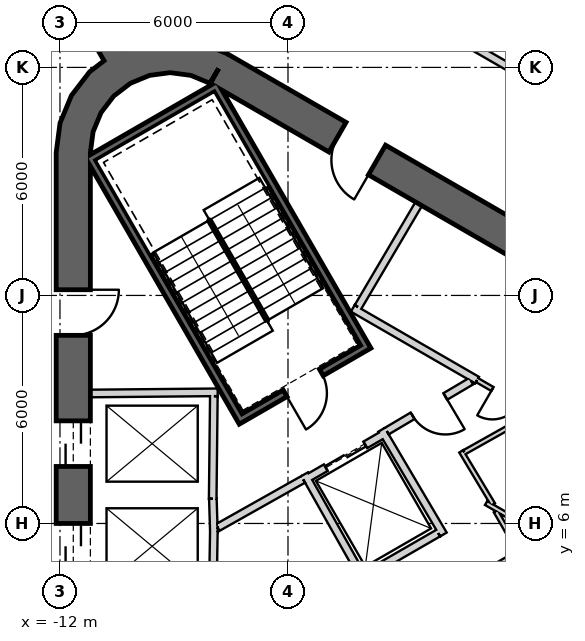
"""IFC4 building model, lengths in metres.
Left out: names, types, materials, properties, quantities, classifications, styles, units other than length and angle.
Written with IfcOpenShell. Run it as: python <this file> out.ifc"""

import sys

from ifc_helpers import new_model, si_unit, direction, frame, frame_2d, origin, place, context, subcontext, project, spatial, polyline, rectangle, outline, extrude, element, fill, save


model = new_model("IFC4")
c1 = context("Model", 3, precision=1e-05, world=origin(), true_north=direction((0.0, 1.0)))
c2 = subcontext(c1, "Body", "Model", "MODEL_VIEW")
j1 = project(units=[si_unit("LENGTHUNIT", "METRE"), si_unit("PLANEANGLEUNIT", "RADIAN")], contexts=[c1])
p1 = place(None, origin())
s1 = spatial("IfcSite", under=j1, at=p1, CompositionType="ELEMENT")
p2 = place(p1, origin())
s2 = spatial("IfcBuilding", under=s1, at=p2, CompositionType="ELEMENT")
p3 = place(p2, frame((0.0, 0.0, 345.5)))
s3 = spatial("IfcBuildingStorey", under=s2, at=p3, CompositionType="ELEMENT", Elevation=345.5)
p4 = place(p3, frame((19.475, 2.208, 0.0), z_axis=(0.0, 0.0, 1.0), x_axis=(-0.866028369851, 0.499994862586, 0.0)))
e1 = element("IfcWall", 1, at=p4, inside=s3, PredefinedType="SHEAR", context=c2, shape_type="SweptSolid", body=[
    extrude(rectangle(XDim=31.523, YDim=0.9, at=frame_2d((15.762, 0.0))), origin(), (0.0, 0.0, 1.0), 3.9),
])
p5 = place(p4, frame((7.062, 0.0, 0.0)))
e2 = element("IfcOpeningElement", 2, at=p5, cuts=e1, PredefinedType="OPENING", context=c2, shape_type="SweptSolid", body=[
    extrude(rectangle(XDim=1.2, YDim=2.4, at=frame_2d((0.6, 1.2))), frame((0.0, 0.46, 0.0), z_axis=(0.0, -1.0, 0.0), x_axis=(1.0, 0.0, 0.0)), (0.0, 0.0, 1.0), 0.92),
])
p6 = place(p4, frame((3.612, 0.0, 0.0)))
e3 = element("IfcOpeningElement", 3, at=p6, cuts=e1, PredefinedType="OPENING", context=c2, shape_type="SweptSolid", body=[
    extrude(rectangle(XDim=1.2, YDim=2.4, at=frame_2d((0.6, 1.2))), frame((0.0, 0.46, 0.0), z_axis=(0.0, -1.0, 0.0), x_axis=(1.0, 0.0, 0.0)), (0.0, 0.0, 1.0), 0.92),
])
p7 = place(p4, frame((26.712, 0.0, 0.0)))
e4 = element("IfcOpeningElement", 4, at=p7, cuts=e1, PredefinedType="OPENING", context=c2, shape_type="SweptSolid", body=[
    extrude(rectangle(XDim=1.2, YDim=2.4, at=frame_2d((0.6, 1.2))), frame((0.0, 0.46, 0.0), z_axis=(0.0, -1.0, 0.0), x_axis=(1.0, 0.0, 0.0)), (0.0, 0.0, 1.0), 0.92),
])
p8 = place(p3, frame((-11.65, 15.762, 0.0), z_axis=(0.0, 0.0, 1.0), x_axis=(0.0, -1.0, 0.0)))
e5 = element("IfcWall", 5, at=p8, inside=s3, PredefinedType="SHEAR", context=c2, shape_type="SweptSolid", body=[
    extrude(rectangle(XDim=31.523, YDim=0.9, at=frame_2d((15.762, 0.0))), origin(), (0.0, 0.0, 1.0), 3.9),
])
p9 = place(p8, frame((7.062, 0.0, 0.0)))
e6 = element("IfcOpeningElement", 6, at=p9, cuts=e5, PredefinedType="OPENING", context=c2, shape_type="SweptSolid", body=[
    extrude(rectangle(XDim=1.2, YDim=2.4, at=frame_2d((0.6, 1.2))), frame((0.0, 0.46, 0.0), z_axis=(0.0, -1.0, 0.0), x_axis=(1.0, 0.0, 0.0)), (0.0, 0.0, 1.0), 0.92),
])
p10 = place(p8, frame((9.762, 0.0, 0.0)))
e7 = element("IfcOpeningElement", 7, at=p10, cuts=e5, PredefinedType="OPENING", context=c2, shape_type="SweptSolid", body=[
    extrude(rectangle(XDim=1.2, YDim=2.4, at=frame_2d((0.6, 1.2))), frame((0.0, 0.46, 0.0), z_axis=(0.0, -1.0, 0.0), x_axis=(1.0, 0.0, 0.0)), (0.0, 0.0, 1.0), 0.92),
])
p11 = place(p8, frame((12.462, 0.0, 0.0)))
e8 = element("IfcOpeningElement", 8, at=p11, cuts=e5, PredefinedType="OPENING", context=c2, shape_type="SweptSolid", body=[
    extrude(rectangle(XDim=1.2, YDim=2.4, at=frame_2d((0.6, 1.2))), frame((0.0, 0.46, 0.0), z_axis=(0.0, -1.0, 0.0), x_axis=(1.0, 0.0, 0.0)), (0.0, 0.0, 1.0), 0.92),
])
p12 = place(p8, frame((15.162, 0.0, 0.0)))
e9 = element("IfcOpeningElement", 9, at=p12, cuts=e5, PredefinedType="OPENING", context=c2, shape_type="SweptSolid", body=[
    extrude(rectangle(XDim=1.2, YDim=2.4, at=frame_2d((0.6, 1.2))), frame((0.0, 0.46, 0.0), z_axis=(0.0, -1.0, 0.0), x_axis=(1.0, 0.0, 0.0)), (0.0, 0.0, 1.0), 0.92),
])
p13 = place(p8, frame((17.862, 0.0, 0.0)))
e10 = element("IfcOpeningElement", 10, at=p13, cuts=e5, PredefinedType="OPENING", context=c2, shape_type="SweptSolid", body=[
    extrude(rectangle(XDim=1.2, YDim=2.4, at=frame_2d((0.6, 1.2))), frame((0.0, 0.46, 0.0), z_axis=(0.0, -1.0, 0.0), x_axis=(1.0, 0.0, 0.0)), (0.0, 0.0, 1.0), 0.92),
])
p14 = place(p8, frame((20.562, 0.0, 0.0)))
e11 = element("IfcOpeningElement", 11, at=p14, cuts=e5, PredefinedType="OPENING", context=c2, shape_type="SweptSolid", body=[
    extrude(rectangle(XDim=1.2, YDim=2.4, at=frame_2d((0.6, 1.2))), frame((0.0, 0.46, 0.0), z_axis=(0.0, -1.0, 0.0), x_axis=(1.0, 0.0, 0.0)), (0.0, 0.0, 1.0), 0.92),
])
p15 = place(p8, frame((23.262, 0.0, 0.0)))
e12 = element("IfcOpeningElement", 12, at=p15, cuts=e5, PredefinedType="OPENING", context=c2, shape_type="SweptSolid", body=[
    extrude(rectangle(XDim=1.2, YDim=2.4, at=frame_2d((0.6, 1.2))), frame((0.0, 0.46, 0.0), z_axis=(0.0, -1.0, 0.0), x_axis=(1.0, 0.0, 0.0)), (0.0, 0.0, 1.0), 0.92),
])
p16 = place(p8, frame((3.612, 0.0, 0.0)))
e13 = element("IfcOpeningElement", 13, at=p16, cuts=e5, PredefinedType="OPENING", context=c2, shape_type="SweptSolid", body=[
    extrude(rectangle(XDim=1.2, YDim=2.4, at=frame_2d((0.6, 1.2))), frame((0.0, 0.46, 0.0), z_axis=(0.0, -1.0, 0.0), x_axis=(1.0, 0.0, 0.0)), (0.0, 0.0, 1.0), 0.92),
])
p17 = place(p8, frame((26.712, 0.0, 0.0)))
e14 = element("IfcOpeningElement", 14, at=p17, cuts=e5, PredefinedType="OPENING", context=c2, shape_type="SweptSolid", body=[
    extrude(rectangle(XDim=1.2, YDim=2.4, at=frame_2d((0.6, 1.2))), frame((0.0, 0.46, 0.0), z_axis=(0.0, -1.0, 0.0), x_axis=(1.0, 0.0, 0.0)), (0.0, 0.0, 1.0), 0.92),
])
p18 = place(p3, origin())
e15 = element("IfcWall", 15, at=p18, inside=s3, PredefinedType="SHEAR", context=c2, shape_type="SweptSolid", body=[
    extrude(outline(polyline([(-7.6, 18.36), (-8.323, 18.659), (-9.1, 18.762), (-9.876, 18.659), (-10.6, 18.36), (-11.221, 17.883), (-11.698, 17.262), (-11.998, 16.538), (-12.1, 15.762), (-11.2, 15.762), (-11.128, 16.305), (-10.919, 16.812), (-10.585, 17.247), (-10.15, 17.58), (-9.644, 17.79), (-9.1, 17.862), (-8.556, 17.79), (-8.05, 17.58), (-7.6, 18.36)])), origin(), (0.0, 0.0, 1.0), 3.9),
])
p19 = place(p3, frame((-10.575, 18.316, 0.0), z_axis=(0.0, 0.0, 1.0), x_axis=(-0.500010354293, 0.866019425648, 0.0)))
e16 = element("IfcWall", 16, at=p19, inside=s3, PredefinedType="SHEAR", context=c2, shape_type="SweptSolid", body=[
    extrude(rectangle(XDim=7.854, YDim=0.6, at=frame_2d((3.927, 0.0))), origin(), (0.0, 0.0, 1.0), 3.9),
])
p20 = place(p19, frame((1.4, 0.0, 0.0)))
e17 = element("IfcOpeningElement", 17, at=p20, cuts=e16, PredefinedType="OPENING", context=c2, shape_type="SweptSolid", body=[
    extrude(rectangle(XDim=1.4, YDim=2.4, at=frame_2d((0.7, 1.2))), frame((0.0, 0.31, 0.0), z_axis=(0.0, -1.0, 0.0), x_axis=(1.0, 0.0, 0.0)), (0.0, 0.0, 1.0), 0.62),
])
p21 = place(p3, frame((-11.2, 9.42, 0.0), z_axis=(0.0, 0.0, 1.0), x_axis=(0.999957167047, 0.009255488683, 0.0)))
e18 = element("IfcWall", 18, at=p21, inside=s3, PredefinedType="PLUMBINGWALL", context=c2, shape_type="SweptSolid", body=[
    extrude(rectangle(XDim=3.35, YDim=0.2, at=frame_2d((1.675, 0.0))), origin(), (0.0, 0.0, 1.0), 3.6),
])
p22 = place(p3, frame((-7.951, 9.35, 0.0), z_axis=(0.0, 0.0, 1.0), x_axis=(-0.011120469654, -0.999938165666, 0.0)))
e19 = element("IfcWall", 19, at=p22, inside=s3, PredefinedType="PLUMBINGWALL", context=c2, shape_type="SweptSolid", body=[
    extrude(rectangle(XDim=2.7, YDim=0.2, at=frame_2d((1.35, 0.0))), origin(), (0.0, 0.0, 1.0), 3.6),
])
p23 = place(p3, frame((-7.977, 6.65, 0.0), z_axis=(0.0, 0.0, 1.0), x_axis=(0.030861509705, -0.999523670164, 0.0)))
e20 = element("IfcWall", 20, at=p23, inside=s3, PredefinedType="PLUMBINGWALL", context=c2, shape_type="SweptSolid", body=[
    extrude(rectangle(XDim=0.878, YDim=0.2, at=frame_2d((0.439, 0.0))), origin(), (0.0, 0.0, 1.0), 3.6),
])
p24 = place(p3, frame((-7.949, 5.894, 0.0), z_axis=(0.0, 0.0, 1.0), x_axis=(-0.016809909365, -0.999858703491, 0.0)))
e21 = element("IfcWall", 21, at=p24, inside=s3, PredefinedType="PLUMBINGWALL", context=c2, shape_type="SweptSolid", body=[
    extrude(rectangle(XDim=1.844, YDim=0.2, at=frame_2d((0.922, 0.0))), origin(), (0.0, 0.0, 1.0), 3.6),
])
p25 = place(p3, frame((-11.245, 15.678, -0.3), z_axis=(0.0, 0.0, 1.0), x_axis=(0.499977274689, -0.866038523851, 0.0)))
e22 = element("IfcWall", 22, at=p25, inside=s3, PredefinedType="SHEAR", context=c2, shape_type="SweptSolid", body=[
    extrude(rectangle(XDim=8.1, YDim=0.2, at=frame_2d((4.05, 0.0))), origin(), (0.0, 0.0, 1.0), 3.9),
])
p26 = place(p3, frame((-7.818, 17.541, -0.3), z_axis=(0.0, 0.0, 1.0), x_axis=(-0.866044365799, -0.499967155389, 0.0)))
e23 = element("IfcWall", 23, at=p26, inside=s3, PredefinedType="SHEAR", context=c2, shape_type="SweptSolid", body=[
    extrude(rectangle(XDim=3.8, YDim=0.2, at=frame_2d((1.9, 0.0))), origin(), (0.0, 0.0, 1.0), 3.9),
])
p27 = place(p3, frame((-7.854, 17.405, -0.3), z_axis=(0.0, 0.0, 1.0), x_axis=(0.499997992926, -0.866026562566, 0.0)))
e24 = element("IfcWall", 24, at=p27, inside=s3, PredefinedType="SHEAR", context=c2, shape_type="SweptSolid", body=[
    extrude(rectangle(XDim=7.9, YDim=0.2, at=frame_2d((3.95, 0.0))), origin(), (0.0, 0.0, 1.0), 3.9),
])
p28 = place(p3, frame((-7.159, 8.8, -0.3), z_axis=(0.0, 0.0, 1.0), x_axis=(0.866047807691, 0.499961193289, 0.0)))
e25 = element("IfcWall", 25, at=p28, inside=s3, PredefinedType="SHEAR", context=c2, shape_type="SweptSolid", body=[
    extrude(rectangle(XDim=3.6, YDim=0.2, at=frame_2d((1.8, 0.0))), origin(), (0.0, 0.0, 1.0), 3.9),
])
p29 = place(p28, frame((1.25, 0.0, 0.3)))
e26 = element("IfcOpeningElement", 26, at=p29, cuts=e25, PredefinedType="OPENING", context=c2, shape_type="SweptSolid", body=[
    extrude(rectangle(XDim=1.1, YDim=2.1, at=frame_2d((0.55, 1.05))), frame((0.0, 0.11, 0.0), z_axis=(0.0, -1.0, 0.0), x_axis=(1.0, 0.0, 0.0)), (0.0, 0.0, 1.0), 0.22),
])
p30 = place(p3, frame((-5.524, 7.168, 0.0), z_axis=(0.0, 0.0, 1.0), x_axis=(0.866024647952, 0.500001309137, 0.0)))
e27 = element("IfcWall", 27, at=p30, inside=s3, PredefinedType="PLUMBINGWALL", context=c2, shape_type="SweptSolid", body=[
    extrude(rectangle(XDim=2.4, YDim=0.2, at=frame_2d((1.2, 0.0))), origin(), (0.0, 0.0, 1.0), 3.6),
])
p31 = place(p30, frame((0.6, 0.0, 0.0)))
e28 = element("IfcOpeningElement", 28, at=p31, cuts=e27, PredefinedType="OPENING", context=c2, shape_type="SweptSolid", body=[
    extrude(rectangle(XDim=1.2, YDim=2.4, at=frame_2d((0.6, 1.2))), frame((0.0, 0.11, 0.0), z_axis=(0.0, -1.0, 0.0), x_axis=(1.0, 0.0, 0.0)), (0.0, 0.0, 1.0), 0.22),
])
p32 = place(p3, frame((-4.039, 4.596, 0.0), z_axis=(0.0, 0.0, 1.0), x_axis=(-0.491322718731, 0.870977603649, 0.0)))
e29 = element("IfcWall", 29, at=p32, inside=s3, PredefinedType="PLUMBINGWALL", context=c2, shape_type="SweptSolid", body=[
    extrude(rectangle(XDim=3.1, YDim=0.2, at=frame_2d((1.55, 0.0))), origin(), (0.0, 0.0, 1.0), 3.6),
])
p33 = place(p3, frame((-3.538, 8.465, 0.0), z_axis=(0.0, 0.0, 1.0), x_axis=(0.508616218331, -0.860993346345, 0.0)))
e30 = element("IfcWall", 30, at=p33, inside=s3, PredefinedType="PLUMBINGWALL", context=c2, shape_type="SweptSolid", body=[
    extrude(rectangle(XDim=3.2, YDim=0.2, at=frame_2d((1.6, 0.0))), origin(), (0.0, 0.0, 1.0), 3.6),
])
p34 = place(p3, frame((-2.047, 5.746, 0.0), z_axis=(0.0, 0.0, 1.0), x_axis=(-0.866019606374, -0.500010041276, 0.0)))
e31 = element("IfcWall", 31, at=p34, inside=s3, PredefinedType="PLUMBINGWALL", context=c2, shape_type="SweptSolid", body=[
    extrude(rectangle(XDim=2.205, YDim=0.2, at=frame_2d((1.102, 0.0))), origin(), (0.0, 0.0, 1.0), 3.6),
])
p35 = place(p3, frame((-1.024, 9.771, 0.0), z_axis=(0.0, 0.0, 1.0), x_axis=(0.866039397417, -0.499975761534, 0.0)))
e32 = element("IfcWall", 32, at=p35, inside=s3, PredefinedType="PARTITIONING", context=c2, shape_type="SweptSolid", body=[
    extrude(rectangle(XDim=1.752, YDim=0.12, at=frame_2d((0.876, 0.0))), origin(), (0.0, 0.0, 1.0), 3.6),
])
p36 = place(p35, frame((0.466, 0.0, 0.0)))
e33 = element("IfcOpeningElement", 33, at=p36, cuts=e32, PredefinedType="OPENING", context=c2, shape_type="SweptSolid", body=[
    extrude(rectangle(XDim=0.8, YDim=2.1, at=frame_2d((0.4, 1.05))), frame((0.0, 0.07, 0.0), z_axis=(0.0, -1.0, 0.0), x_axis=(1.0, 0.0, 0.0)), (0.0, 0.0, 1.0), 0.14),
])
p37 = place(p3, frame((-4.296, 11.66, 0.0), z_axis=(0.0, 0.0, 1.0), x_axis=(0.866027389382, -0.499996560828, 0.0)))
e34 = element("IfcWall", 34, at=p37, inside=s3, PredefinedType="PARTITIONING", context=c2, shape_type="SweptSolid", body=[
    extrude(rectangle(XDim=3.778, YDim=0.2, at=frame_2d((1.889, 0.0))), origin(), (0.0, 0.0, 1.0), 3.6),
])
p38 = place(p3, frame((-2.558, 14.409, 0.0), z_axis=(0.0, 0.0, 1.0), x_axis=(-0.508018930956, -0.861345903683, 0.0)))
e35 = element("IfcWall", 35, at=p38, inside=s3, PredefinedType="PARTITIONING", context=c2, shape_type="SweptSolid", body=[
    extrude(rectangle(XDim=3.15, YDim=0.2, at=frame_2d((1.575, 0.0))), origin(), (0.0, 0.0, 1.0), 3.6),
])
p39 = place(p3, frame((-5.6, 7.16, 0.0), z_axis=(0.0, 0.0, 1.0), x_axis=(-0.871340486379, -0.490678873396, 0.0)))
e36 = element("IfcWall", 36, at=p39, inside=s3, PredefinedType="PARTITIONING", context=c2, shape_type="SweptSolid", body=[
    extrude(rectangle(XDim=2.581, YDim=0.2, at=frame_2d((1.291, 0.0))), origin(), (0.0, 0.0, 1.0), 3.6),
])
p40 = place(p3, frame((-1.179, 9.745, 0.0), z_axis=(0.0, 0.0, 1.0), x_axis=(-0.860630814782, -0.509229418482, 0.0)))
e37 = element("IfcWall", 37, at=p40, inside=s3, PredefinedType="PARTITIONING", context=c2, shape_type="SweptSolid", body=[
    extrude(rectangle(XDim=2.582, YDim=0.2, at=frame_2d((1.291, 0.0))), origin(), (0.0, 0.0, 1.0), 3.6),
])
p41 = place(p40, frame((0.791, 0.0, 0.0)))
e38 = element("IfcOpeningElement", 38, at=p41, cuts=e37, PredefinedType="OPENING", context=c2, shape_type="SweptSolid", body=[
    extrude(rectangle(XDim=1.0, YDim=2.1, at=frame_2d((0.5, 1.05))), frame((0.0, 0.11, 0.0), z_axis=(0.0, -1.0, 0.0), x_axis=(1.0, 0.0, 0.0)), (0.0, 0.0, 1.0), 0.22),
])
p42 = place(p3, frame((-0.786, 6.538, 0.0), z_axis=(0.0, 0.0, 1.0), x_axis=(0.866034288228, -0.499984611377, 0.0)))
e39 = element("IfcWall", 39, at=p42, inside=s3, PredefinedType="PARTITIONING", context=c2, shape_type="SweptSolid", body=[
    extrude(rectangle(XDim=7.9, YDim=0.12, at=frame_2d((3.95, 0.0))), origin(), (0.0, 0.0, 1.0), 3.6),
])
p43 = place(p3, frame((0.709, 5.605, 0.0), z_axis=(0.0, 0.0, 1.0), x_axis=(-0.8660096254, -0.500027327967, 0.0)))
e40 = element("IfcWall", 40, at=p43, inside=s3, PredefinedType="PARTITIONING", context=c2, shape_type="SweptSolid", body=[
    extrude(rectangle(XDim=2.357, YDim=0.12, at=frame_2d((1.178, 0.0))), origin(), (0.0, 0.0, 1.0), 3.6),
])
p44 = place(p3, frame((-0.532, 6.322, 0.0), z_axis=(0.0, 0.0, 1.0), x_axis=(0.50005036918, -0.865996321171, 0.0)))
e41 = element("IfcWall", 41, at=p44, inside=s3, PredefinedType="PARTITIONING", context=c2, shape_type="SweptSolid", body=[
    extrude(rectangle(XDim=1.182, YDim=0.12, at=frame_2d((0.591, 0.0))), origin(), (0.0, 0.0, 1.0), 3.6),
])
p45 = place(p3, frame((-1.443, 7.897, 0.0), z_axis=(0.0, 0.0, 1.0), x_axis=(0.514937238613, -0.85722788119, 0.0)))
e42 = element("IfcWall", 42, at=p45, inside=s3, PredefinedType="PARTITIONING", context=c2, shape_type="SweptSolid", body=[
    extrude(rectangle(XDim=1.626, YDim=0.12, at=frame_2d((0.813, 0.0))), origin(), (0.0, 0.0, 1.0), 3.6),
])
p46 = place(p3, frame((0.414, 8.871, 0.0), z_axis=(0.0, 0.0, 1.0), x_axis=(-0.871809386997, -0.48984527429, 0.0)))
e43 = element("IfcWall", 43, at=p46, inside=s3, PredefinedType="PARTITIONING", context=c2, shape_type="SweptSolid", body=[
    extrude(rectangle(XDim=2.034, YDim=0.12, at=frame_2d((1.017, 0.0))), origin(), (0.0, 0.0, 1.0), 3.6),
])
p47 = place(p3, frame((22.074, 5.153, 0.0), z_axis=(0.0, 0.0, 1.0), x_axis=(-0.866023485483, 0.500003322581, 0.0)))
e44 = element("IfcWall", 44, at=p47, inside=s3, PredefinedType="PARTITIONING", context=c2, shape_type="SweptSolid", body=[
    extrude(rectangle(XDim=32.881, YDim=0.2, at=frame_2d((16.44, 0.0))), origin(), (0.0, 0.0, 1.0), 2.97),
])
p48 = place(p47, frame((15.99, 0.0, 0.0)))
e45 = element("IfcOpeningElement", 45, at=p48, cuts=e44, PredefinedType="OPENING", context=c2, shape_type="SweptSolid", body=[
    extrude(rectangle(XDim=1.0, YDim=2.1, at=frame_2d((0.5, 1.05))), frame((0.0, 0.11, 0.0), z_axis=(0.0, -1.0, 0.0), x_axis=(1.0, 0.0, 0.0)), (0.0, 0.0, 1.0), 0.22),
])
p49 = place(p29, origin())
e46 = element("IfcDoor", 46, at=p49, inside=s3, OperationType="SINGLE_SWING_LEFT", PredefinedType="USERDEFINED", context=c2, shape_type="SweptSolid", body=[
    extrude(rectangle(XDim=1.1, YDim=2.1, at=frame_2d((0.55, 1.05))), frame((0.0, 0.025, 0.0), z_axis=(0.0, -1.0, 0.0), x_axis=(1.0, 0.0, 0.0)), (0.0, 0.0, 1.0), 0.05),
])
fill(e26, e46)
p50 = place(p41, origin())
e47 = element("IfcDoor", 47, at=p50, inside=s3, OperationType="SINGLE_SWING_LEFT", PredefinedType="USERDEFINED", context=c2, shape_type="SweptSolid", body=[
    extrude(rectangle(XDim=1.0, YDim=2.1, at=frame_2d((0.5, 1.05))), frame((0.0, 0.025, 0.0), z_axis=(0.0, -1.0, 0.0), x_axis=(1.0, 0.0, 0.0)), (0.0, 0.0, 1.0), 0.05),
])
fill(e38, e47)
p51 = place(p31, origin())
e48 = element("IfcDoor", 48, at=p51, inside=s3, OperationType="SLIDING_TO_LEFT", PredefinedType="USERDEFINED", context=c2, shape_type="SweptSolid", body=[
    extrude(rectangle(XDim=1.2, YDim=2.4, at=frame_2d((0.6, 1.2))), frame((0.0, 0.025, 0.0), z_axis=(0.0, -1.0, 0.0), x_axis=(1.0, 0.0, 0.0)), (0.0, 0.0, 1.0), 0.05),
])
fill(e28, e48)
p52 = place(p36, origin())
e49 = element("IfcDoor", 49, at=p52, inside=s3, OperationType="SINGLE_SWING_RIGHT", PredefinedType="USERDEFINED", context=c2, shape_type="SweptSolid", body=[
    extrude(rectangle(XDim=0.8, YDim=2.1, at=frame_2d((0.4, 1.05))), frame((0.0, 0.025, 0.0), z_axis=(0.0, -1.0, 0.0), x_axis=(1.0, 0.0, 0.0)), (0.0, 0.0, 1.0), 0.05),
])
fill(e33, e49)
p53 = place(p9, origin())
e50 = element("IfcDoor", 50, at=p53, inside=s3, OperationType="SLIDING_TO_LEFT", PredefinedType="USERDEFINED", context=c2, shape_type="SweptSolid", body=[
    extrude(rectangle(XDim=1.2, YDim=2.4, at=frame_2d((0.6, 1.2))), frame((0.0, 0.025, 0.0), z_axis=(0.0, -1.0, 0.0), x_axis=(1.0, 0.0, 0.0)), (0.0, 0.0, 1.0), 0.05),
])
fill(e6, e50)
p54 = place(p10, origin())
e51 = element("IfcDoor", 51, at=p54, inside=s3, OperationType="SLIDING_TO_LEFT", PredefinedType="USERDEFINED", context=c2, shape_type="SweptSolid", body=[
    extrude(rectangle(XDim=1.2, YDim=2.4, at=frame_2d((0.6, 1.2))), frame((0.0, 0.025, 0.0), z_axis=(0.0, -1.0, 0.0), x_axis=(1.0, 0.0, 0.0)), (0.0, 0.0, 1.0), 0.05),
])
fill(e7, e51)
p55 = place(p7, origin())
e52 = element("IfcDoor", 52, at=p55, inside=s3, OperationType="SINGLE_SWING_RIGHT", PredefinedType="USERDEFINED", context=c2, shape_type="SweptSolid", body=[
    extrude(rectangle(XDim=1.2, YDim=2.4, at=frame_2d((0.6, 1.2))), frame((0.0, 0.025, 0.0), z_axis=(0.0, -1.0, 0.0), x_axis=(1.0, 0.0, 0.0)), (0.0, 0.0, 1.0), 0.05),
])
fill(e4, e52)
p56 = place(p16, origin())
e53 = element("IfcDoor", 53, at=p56, inside=s3, OperationType="SINGLE_SWING_RIGHT", PredefinedType="USERDEFINED", context=c2, shape_type="SweptSolid", body=[
    extrude(rectangle(XDim=1.2, YDim=2.4, at=frame_2d((0.6, 1.2))), frame((0.0, 0.025, 0.0), z_axis=(0.0, -1.0, 0.0), x_axis=(1.0, 0.0, 0.0)), (0.0, 0.0, 1.0), 0.05),
])
fill(e13, e53)
save(model, sys.argv[1])
